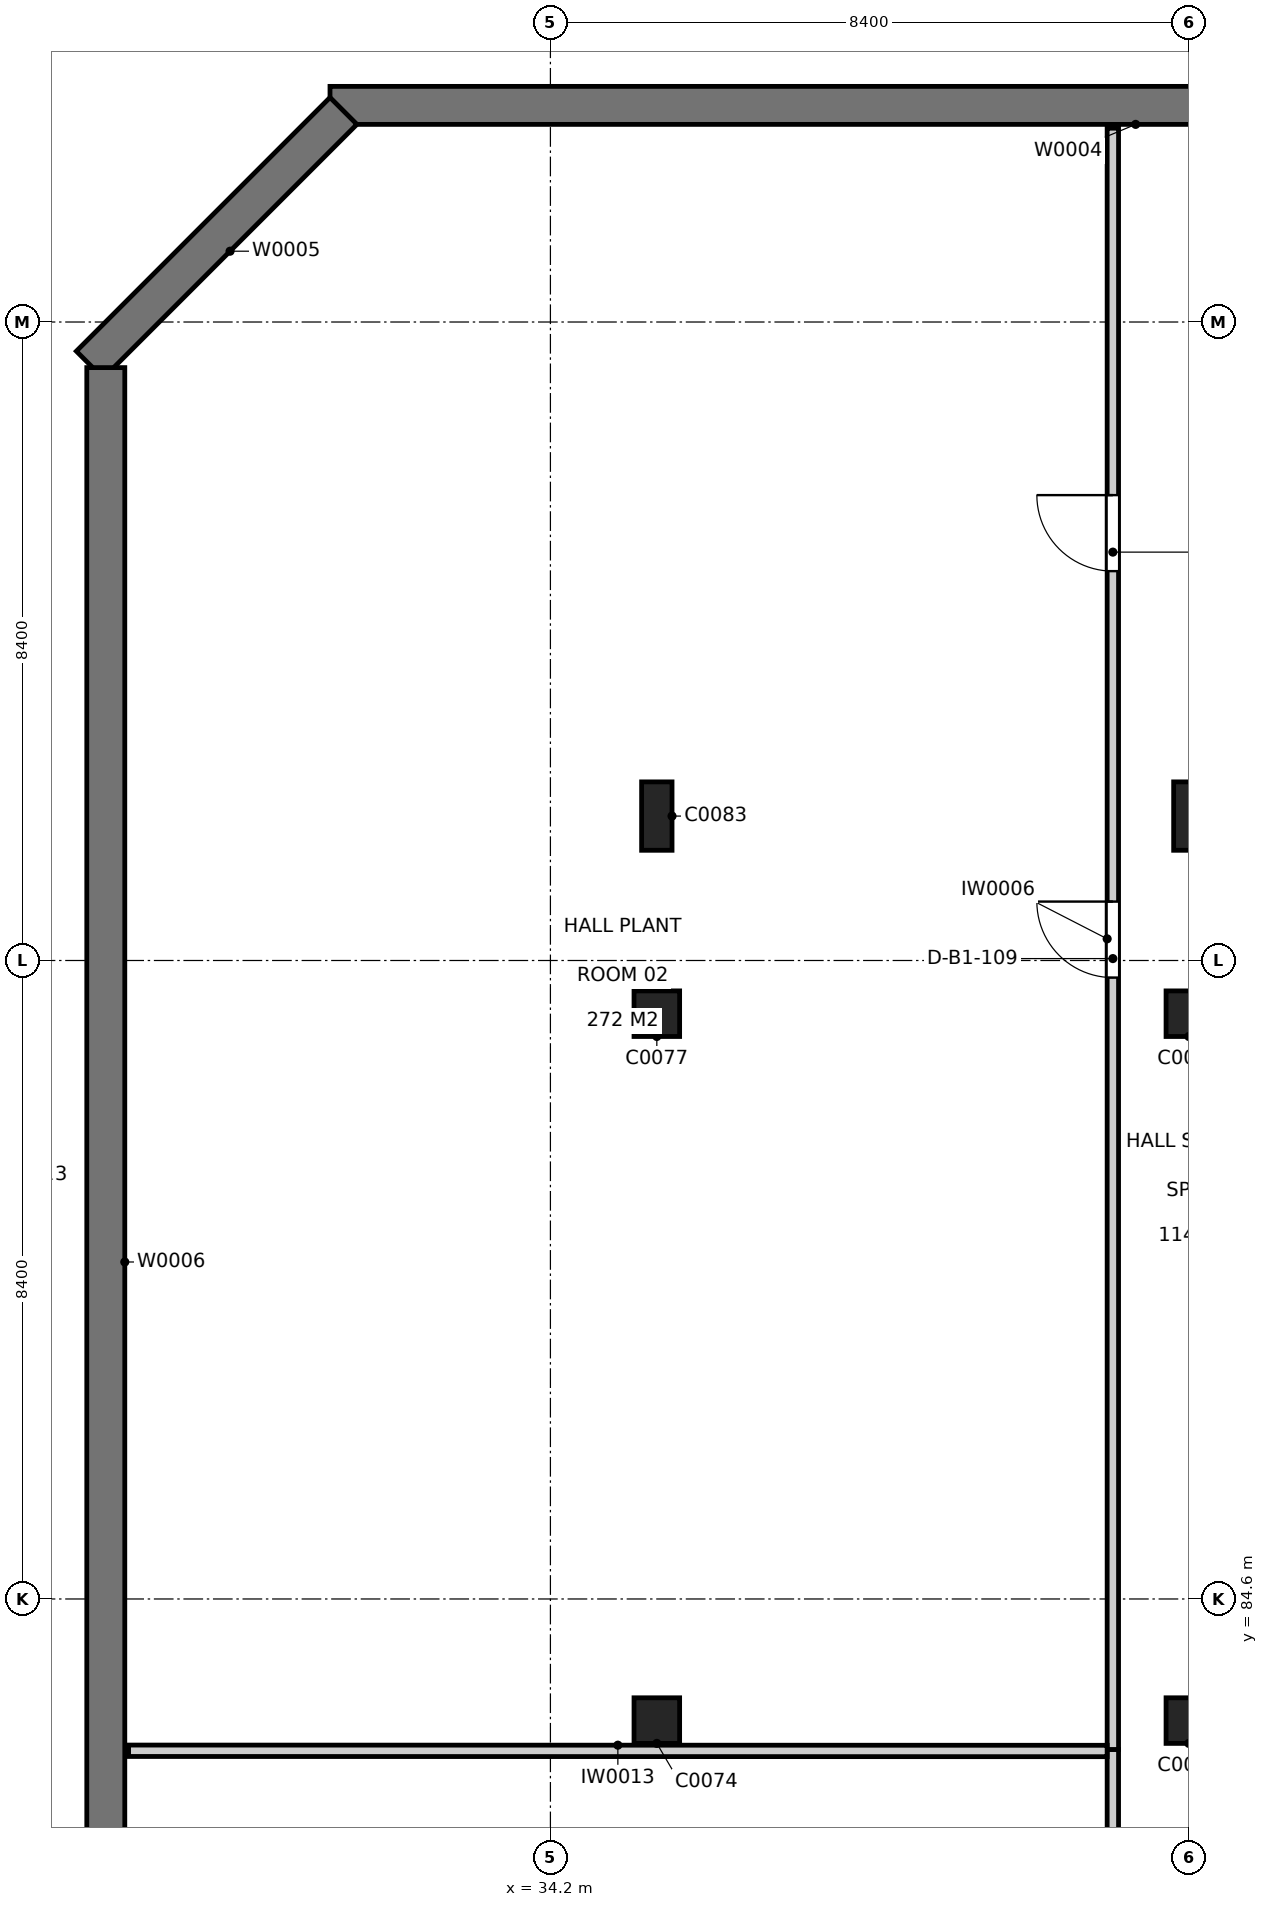
"""IFC4 building model, lengths in metres.
Left out: names, types, materials, properties, quantities, classifications, styles, units other than length and angle.
Written with IfcOpenShell. Run it as: python <this file> out.ifc"""

import sys

from ifc_helpers import new_model, si_unit, direction, frame, frame_2d, origin, origin_2d, place, context, subcontext, project, spatial, rectangle, extrude, element, fill, save


model = new_model("IFC4")
c1 = context("Model", 3, precision=1e-05, world=origin(), true_north=direction((0.0, 1.0)))
c2 = subcontext(c1, "Body", "Model", "MODEL_VIEW")
j1 = project(units=[si_unit("LENGTHUNIT", "METRE"), si_unit("PLANEANGLEUNIT", "RADIAN")], contexts=[c1])
p1 = place(None, origin())
s1 = spatial("IfcSite", under=j1, at=p1, CompositionType="ELEMENT")
p2 = place(p1, origin())
s2 = spatial("IfcBuilding", under=s1, at=p2, CompositionType="ELEMENT")
p3 = place(p2, frame((0.0, 0.0, -5.0)))
s3 = spatial("IfcBuildingStorey", under=s2, at=p3, CompositionType="ELEMENT", Elevation=-5.0)
for number, where, z_axis, x_axis in (
    (1, (35.6, 83.0, -0.5), (0.0, 0.0, 1.0), (1.0, 0.0, 0.0)),
    (2, (42.6, 83.0, -0.5), (0.0, 0.0, 1.0), (1.0, 0.0, 0.0)),
    (3, (35.6, 92.3, -0.5), (0.0, 0.0, 1.0), (1.0, 0.0, 0.0)),
    (4, (42.6, 92.3, -0.5), (0.0, 0.0, 1.0), (1.0, 0.0, 0.0)),
):
    element("IfcColumn", number, at=place(p3, frame(where, z_axis=z_axis, x_axis=x_axis)), inside=s3, PredefinedType="COLUMN", context=c2, shape_type="SweptSolid", body=[
        extrude(rectangle(XDim=0.6, YDim=0.6, at=origin_2d()), origin(), (0.0, 0.0, 1.0), 5.5),
    ])
for number, where, z_axis, x_axis in (
    (5, (35.6, 94.9, -0.5), (0.0, 0.0, 1.0), (1.0, 0.0, 0.0)),
    (6, (42.6, 94.9, -0.5), (0.0, 0.0, 1.0), (1.0, 0.0, 0.0)),
):
    element("IfcColumn", number, at=place(p3, frame(where, z_axis=z_axis, x_axis=x_axis)), inside=s3, PredefinedType="COLUMN", context=c2, shape_type="SweptSolid", body=[
        extrude(rectangle(XDim=0.4, YDim=0.9, at=origin_2d()), origin(), (0.0, 0.0, 1.0), 5.5),
    ])
p4 = place(p3, frame((53.9, 104.25, 0.0), z_axis=(0.0, 0.0, 1.0), x_axis=(-1.0, 0.0, 0.0)))
e7 = element("IfcWall", 7, at=p4, inside=s3, PredefinedType="SOLIDWALL", context=c2, shape_type="SweptSolid", body=[
    extrude(rectangle(XDim=22.6, YDim=0.5, at=frame_2d((11.3, 0.0))), origin(), (0.0, 0.0, 1.0), 5.0),
])
p5 = place(p4, frame((10.15, 0.0, 0.0)))
e8 = element("IfcOpeningElement", 8, at=p5, cuts=e7, PredefinedType="OPENING", context=c2, shape_type="SweptSolid", body=[
    extrude(rectangle(XDim=1.0, YDim=2.1, at=frame_2d((0.5, 1.05))), frame((0.0, 0.26, 0.0), z_axis=(0.0, -1.0, 0.0), x_axis=(1.0, 0.0, 0.0)), (0.0, 0.0, 1.0), 0.52),
])
p6 = place(p3, frame((31.477, 104.177, 0.0), z_axis=(0.0, 0.0, 1.0), x_axis=(-0.707106781187, -0.707106781187, 0.0)))
e9 = element("IfcWall", 9, at=p6, inside=s3, PredefinedType="SOLIDWALL", context=c2, shape_type="SweptSolid", body=[
    extrude(rectangle(XDim=4.72, YDim=0.5, at=frame_2d((2.36, 0.0))), origin(), (0.0, 0.0, 1.0), 5.0),
])
p7 = place(p3, frame((28.35, 100.8, 0.0), z_axis=(0.0, 0.0, 1.0), x_axis=(0.0, -1.0, 0.0)))
e10 = element("IfcWall", 10, at=p7, inside=s3, PredefinedType="SOLIDWALL", context=c2, shape_type="SweptSolid", body=[
    extrude(rectangle(XDim=38.151, YDim=0.5, at=frame_2d((19.076, 0.0))), origin(), (0.0, 0.0, 1.0), 5.0),
])
p8 = place(p3, frame((41.6, 60.2, 0.0), z_axis=(0.0, 0.0, 1.0), x_axis=(0.0, 1.0, 0.0)))
e11 = element("IfcWall", 11, at=p8, inside=s3, PredefinedType="PARTITIONING", context=c2, shape_type="SweptSolid", body=[
    extrude(rectangle(XDim=22.42, YDim=0.15, at=frame_2d((11.21, 0.0))), origin(), (0.0, 0.0, 1.0), 4.75),
])
p9 = place(p8, frame((11.3, 0.0, 0.0)))
e12 = element("IfcOpeningElement", 12, at=p9, cuts=e11, PredefinedType="OPENING", context=c2, shape_type="SweptSolid", body=[
    extrude(rectangle(XDim=1.0, YDim=2.1, at=frame_2d((0.5, 1.05))), frame((0.0, 0.085, 0.0), z_axis=(0.0, -1.0, 0.0), x_axis=(1.0, 0.0, 0.0)), (0.0, 0.0, 1.0), 0.17),
])
p10 = place(p8, frame((16.31, 0.0, 0.0)))
e13 = element("IfcOpeningElement", 13, at=p10, cuts=e11, PredefinedType="OPENING", context=c2, shape_type="SweptSolid", body=[
    extrude(rectangle(XDim=1.0, YDim=2.1, at=frame_2d((0.5, 1.05))), frame((0.0, 0.085, 0.0), z_axis=(0.0, -1.0, 0.0), x_axis=(1.0, 0.0, 0.0)), (0.0, 0.0, 1.0), 0.17),
])
p11 = place(p3, frame((41.6, 82.62, 0.0), z_axis=(0.0, 0.0, 1.0), x_axis=(0.0, 1.0, 0.0)))
e14 = element("IfcWall", 14, at=p11, inside=s3, PredefinedType="PARTITIONING", context=c2, shape_type="SweptSolid", body=[
    extrude(rectangle(XDim=21.33, YDim=0.15, at=frame_2d((10.665, 0.0))), origin(), (0.0, 0.0, 1.0), 4.75),
])
p12 = place(p11, frame((10.155, 0.0, 0.0)))
e15 = element("IfcOpeningElement", 15, at=p12, cuts=e14, PredefinedType="OPENING", context=c2, shape_type="SweptSolid", body=[
    extrude(rectangle(XDim=1.0, YDim=2.1, at=frame_2d((0.5, 1.05))), frame((0.0, 0.085, 0.0), z_axis=(0.0, -1.0, 0.0), x_axis=(1.0, 0.0, 0.0)), (0.0, 0.0, 1.0), 0.17),
])
p13 = place(p11, frame((15.502, 0.0, 0.0)))
e16 = element("IfcOpeningElement", 16, at=p13, cuts=e14, PredefinedType="OPENING", context=c2, shape_type="SweptSolid", body=[
    extrude(rectangle(XDim=1.0, YDim=2.1, at=frame_2d((0.5, 1.05))), frame((0.0, 0.085, 0.0), z_axis=(0.0, -1.0, 0.0), x_axis=(1.0, 0.0, 0.0)), (0.0, 0.0, 1.0), 0.17),
])
p14 = place(p3, frame((28.65, 82.603, 0.0), z_axis=(0.0, 0.0, 1.0), x_axis=(0.999999974111, -0.000227548538, 0.0)))
e17 = element("IfcWall", 17, at=p14, inside=s3, PredefinedType="PARTITIONING", context=c2, shape_type="SweptSolid", body=[
    extrude(rectangle(XDim=12.875, YDim=0.15, at=frame_2d((6.438, 0.0))), origin(), (0.0, 0.0, 1.0), 4.75),
])
p15 = place(p12, origin())
e18 = element("IfcDoor", 18, at=p15, inside=s3, OperationType="SINGLE_SWING_RIGHT", PredefinedType="DOOR", context=c2, shape_type="SweptSolid", body=[
    extrude(rectangle(XDim=1.0, YDim=2.1, at=frame_2d((0.5, 1.05))), frame((0.0, 0.025, 0.0), z_axis=(0.0, -1.0, 0.0), x_axis=(1.0, 0.0, 0.0)), (0.0, 0.0, 1.0), 0.05),
])
fill(e15, e18)
p16 = place(p13, origin())
e19 = element("IfcDoor", 19, at=p16, inside=s3, OperationType="SINGLE_SWING_RIGHT", PredefinedType="DOOR", context=c2, shape_type="SweptSolid", body=[
    extrude(rectangle(XDim=1.0, YDim=2.1, at=frame_2d((0.5, 1.05))), frame((0.0, 0.025, 0.0), z_axis=(0.0, -1.0, 0.0), x_axis=(1.0, 0.0, 0.0)), (0.0, 0.0, 1.0), 0.05),
])
fill(e16, e19)
save(model, sys.argv[1])
